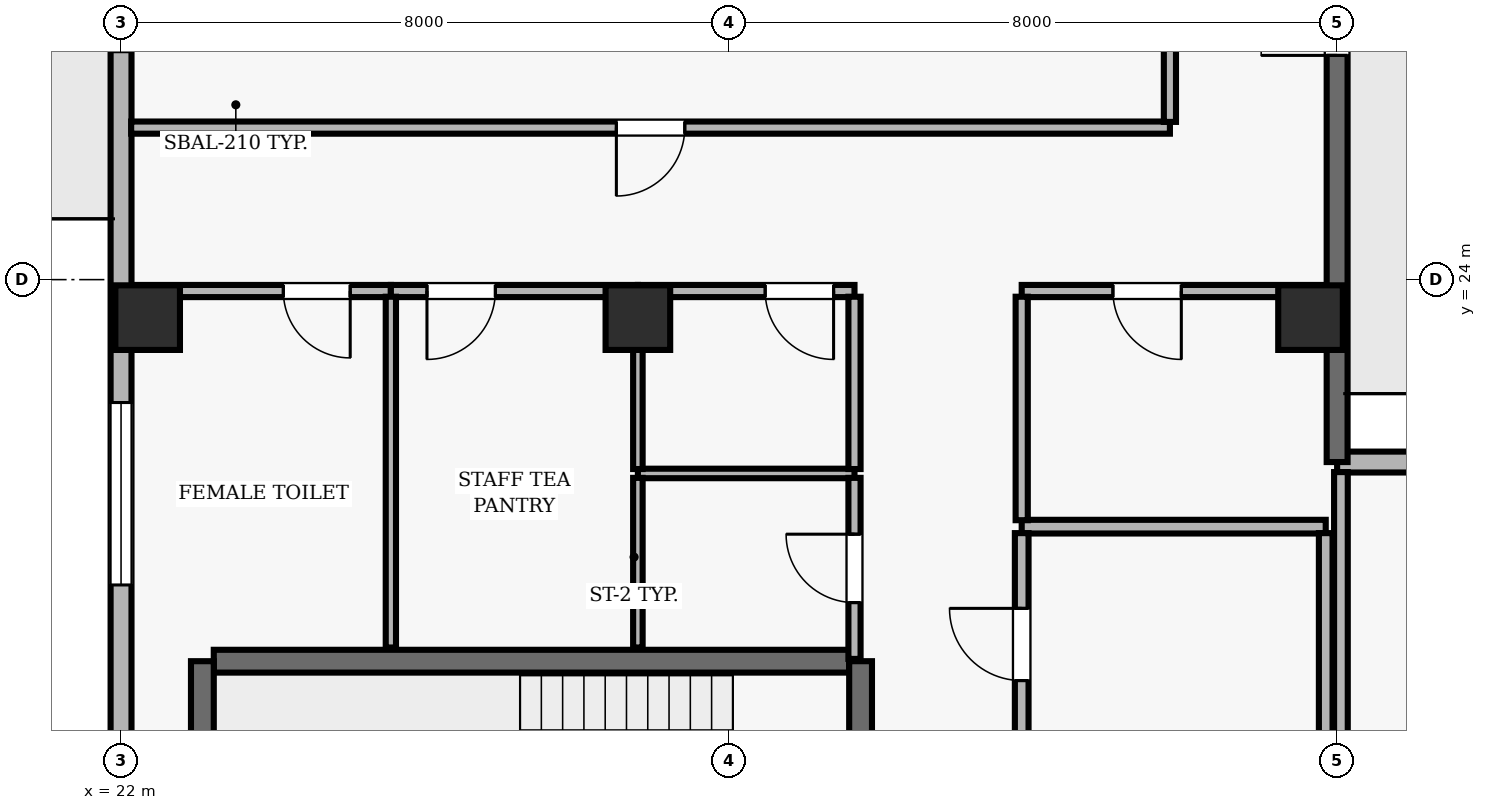
"""IFC4 building model, lengths in metres.
Left out: names, types, materials, properties, quantities, classifications, styles, units other than length and angle.
Written with IfcOpenShell. Run it as: python <this file> out.ifc"""

import sys

from ifc_helpers import new_model, si_unit, direction, frame, frame_2d, origin, origin_2d, place, context, subcontext, project, spatial, rectangle, extrude, element, fill, save


model = new_model("IFC4")
c1 = context("Model", 3, precision=1e-05, world=origin(), true_north=direction((0.0, 1.0)))
c2 = subcontext(c1, "Body", "Model", "MODEL_VIEW")
j1 = project(units=[si_unit("LENGTHUNIT", "METRE"), si_unit("PLANEANGLEUNIT", "RADIAN")], contexts=[c1])
p1 = place(None, origin())
s1 = spatial("IfcSite", under=j1, at=p1, CompositionType="ELEMENT")
p2 = place(p1, origin())
s2 = spatial("IfcBuilding", under=s1, at=p2, CompositionType="ELEMENT")
p3 = place(p2, frame((0.0, 0.0, 287.2)))
s3 = spatial("IfcBuildingStorey", under=s2, at=p3, CompositionType="ELEMENT", Elevation=287.2)
for number, where, z_axis, x_axis in (
    (1, (22.35, 23.5, 0.0), (0.0, 0.0, 1.0), (1.0, 0.0, 0.0)),
    (2, (28.8, 23.5, 0.0), (0.0, 0.0, 1.0), (1.0, 0.0, 0.0)),
    (3, (37.65, 23.5, 0.0), (0.0, 0.0, 1.0), (1.0, 0.0, 0.0)),
):
    element("IfcColumn", number, at=place(p3, frame(where, z_axis=z_axis, x_axis=x_axis)), inside=s3, PredefinedType="COLUMN", context=c2, shape_type="SweptSolid", body=[
        extrude(rectangle(XDim=0.85, YDim=0.85, at=origin_2d()), origin(), (0.0, 0.0, 1.0), 3.9),
    ])
p4 = place(p3, frame((43.0, 21.6, 0.0), z_axis=(0.0, 0.0, 1.0), x_axis=(-1.0, 0.0, 0.0)))
e4 = element("IfcWall", 4, at=p4, inside=s3, PredefinedType="SOLIDWALL", context=c2, shape_type="SweptSolid", body=[
    extrude(rectangle(XDim=5.0, YDim=0.275, at=frame_2d((2.5, 0.0))), origin(), (0.0, 0.0, 1.0), 3.69),
])
p5 = place(p3, frame((38.0, 21.6, 0.0), z_axis=(0.0, 0.0, 1.0), x_axis=(0.0, 1.0, 0.0)))
e5 = element("IfcWall", 5, at=p5, inside=s3, PredefinedType="SOLIDWALL", context=c2, shape_type="SweptSolid", body=[
    extrude(rectangle(XDim=13.7, YDim=0.275, at=frame_2d((6.85, 0.0))), origin(), (0.0, 0.0, 1.0), 3.69),
])
p6 = place(p5, frame((5.35, 0.0, 0.0)))
e6 = element("IfcOpeningElement", 6, at=p6, cuts=e5, PredefinedType="OPENING", context=c2, shape_type="SweptSolid", body=[
    extrude(rectangle(XDim=1.0, YDim=2.2, at=frame_2d((0.5, 1.1))), frame((0.0, 0.147, 0.0), z_axis=(0.0, -1.0, 0.0), x_axis=(1.0, 0.0, 0.0)), (0.0, 0.0, 1.0), 0.295),
])
p7 = place(p5, frame((9.375, 0.0, 0.9)))
e7 = element("IfcOpeningElement", 7, at=p7, cuts=e5, PredefinedType="OPENING", context=c2, shape_type="SweptSolid", body=[
    extrude(rectangle(XDim=1.8, YDim=1.8, at=frame_2d((0.9, 0.9))), frame((0.0, 0.147, 0.0), z_axis=(0.0, -1.0, 0.0), x_axis=(1.0, 0.0, 0.0)), (0.0, 0.0, 1.0), 0.295),
])
p8 = place(p3, frame((22.0, 35.3, 0.0), z_axis=(0.0, 0.0, 1.0), x_axis=(0.0, -1.0, 0.0)))
e8 = element("IfcWall", 8, at=p8, inside=s3, PredefinedType="SOLIDWALL", context=c2, shape_type="SweptSolid", body=[
    extrude(rectangle(XDim=32.8, YDim=0.275, at=frame_2d((16.4, 0.0))), origin(), (0.0, 0.0, 1.0), 3.69),
])
p9 = place(p8, frame((7.3, 0.0, 0.0)))
e9 = element("IfcOpeningElement", 9, at=p9, cuts=e8, PredefinedType="OPENING", context=c2, shape_type="SweptSolid", body=[
    extrude(rectangle(XDim=1.0, YDim=2.2, at=frame_2d((0.5, 1.1))), frame((0.0, 0.147, 0.0), z_axis=(0.0, -1.0, 0.0), x_axis=(1.0, 0.0, 0.0)), (0.0, 0.0, 1.0), 0.295),
])
p10 = place(p8, frame((1.533, 0.0, 0.9)))
e10 = element("IfcOpeningElement", 10, at=p10, cuts=e8, PredefinedType="OPENING", context=c2, shape_type="SweptSolid", body=[
    extrude(rectangle(XDim=2.4, YDim=2.2, at=frame_2d((1.2, 1.1))), frame((0.0, 0.147, 0.0), z_axis=(0.0, -1.0, 0.0), x_axis=(1.0, 0.0, 0.0)), (0.0, 0.0, 1.0), 0.295),
])
p11 = place(p8, frame((12.917, 0.0, 0.9)))
e11 = element("IfcOpeningElement", 11, at=p11, cuts=e8, PredefinedType="OPENING", context=c2, shape_type="SweptSolid", body=[
    extrude(rectangle(XDim=2.4, YDim=2.2, at=frame_2d((1.2, 1.1))), frame((0.0, 0.147, 0.0), z_axis=(0.0, -1.0, 0.0), x_axis=(1.0, 0.0, 0.0)), (0.0, 0.0, 1.0), 0.295),
])
p12 = place(p8, frame((17.483, 0.0, 0.9)))
e12 = element("IfcOpeningElement", 12, at=p12, cuts=e8, PredefinedType="OPENING", context=c2, shape_type="SweptSolid", body=[
    extrude(rectangle(XDim=2.4, YDim=2.2, at=frame_2d((1.2, 1.1))), frame((0.0, 0.147, 0.0), z_axis=(0.0, -1.0, 0.0), x_axis=(1.0, 0.0, 0.0)), (0.0, 0.0, 1.0), 0.295),
])
p13 = place(p8, frame((23.4, 0.0, 0.9)))
e13 = element("IfcOpeningElement", 13, at=p13, cuts=e8, PredefinedType="OPENING", context=c2, shape_type="SweptSolid", body=[
    extrude(rectangle(XDim=2.4, YDim=2.2, at=frame_2d((1.2, 1.1))), frame((0.0, 0.147, 0.0), z_axis=(0.0, -1.0, 0.0), x_axis=(1.0, 0.0, 0.0)), (0.0, 0.0, 1.0), 0.295),
])
p14 = place(p3, frame((31.58, 18.98, 0.0), z_axis=(0.0, 0.0, 1.0), x_axis=(-1.0, 0.0, 0.0)))
e14 = element("IfcWall", 14, at=p14, inside=s3, PredefinedType="SHEAR", context=c2, shape_type="SweptSolid", body=[
    extrude(rectangle(XDim=8.36, YDim=0.3, at=frame_2d((4.18, 0.0))), origin(), (0.0, 0.0, 1.0), 3.69),
])
p15 = place(p3, frame((23.07, 18.98, 0.0), z_axis=(0.0, 0.0, 1.0), x_axis=(0.0, -1.0, 0.0)))
e15 = element("IfcWall", 15, at=p15, inside=s3, PredefinedType="SHEAR", context=c2, shape_type="SweptSolid", body=[
    extrude(rectangle(XDim=3.51, YDim=0.3, at=frame_2d((1.755, 0.0))), origin(), (0.0, 0.0, 1.0), 3.69),
])
p16 = place(p3, frame((31.73, 15.47, 0.0), z_axis=(0.0, 0.0, 1.0), x_axis=(0.0, 1.0, 0.0)))
e16 = element("IfcWall", 16, at=p16, inside=s3, PredefinedType="SHEAR", context=c2, shape_type="SweptSolid", body=[
    extrude(rectangle(XDim=3.51, YDim=0.3, at=frame_2d((1.755, 0.0))), origin(), (0.0, 0.0, 1.0), 3.69),
])
p17 = place(p16, frame((1.18, 0.0, 0.0)))
e17 = element("IfcOpeningElement", 17, at=p17, cuts=e16, PredefinedType="OPENING", context=c2, shape_type="SweptSolid", body=[
    extrude(rectangle(XDim=1.15, YDim=2.15, at=frame_2d((0.575, 1.075))), frame((0.0, 0.16, 0.0), z_axis=(0.0, -1.0, 0.0), x_axis=(1.0, 0.0, 0.0)), (0.0, 0.0, 1.0), 0.32),
])
p18 = place(p3, frame((25.55, 23.85, 0.0), z_axis=(0.0, 0.0, 1.0), x_axis=(-1.0, 0.0, 0.0)))
e18 = element("IfcWall", 18, at=p18, inside=s3, PredefinedType="PARTITIONING", context=c2, shape_type="SweptSolid", body=[
    extrude(rectangle(XDim=3.35, YDim=0.16, at=frame_2d((1.675, 0.0))), origin(), (0.0, 0.0, 1.0), 3.221),
])
p19 = place(p18, frame((0.535, 0.0, 0.0)))
e19 = element("IfcOpeningElement", 19, at=p19, cuts=e18, PredefinedType="OPENING", context=c2, shape_type="SweptSolid", body=[
    extrude(rectangle(XDim=0.88, YDim=2.1, at=frame_2d((0.44, 1.05))), frame((0.0, 0.09, 0.0), z_axis=(0.0, -1.0, 0.0), x_axis=(1.0, 0.0, 0.0)), (0.0, 0.0, 1.0), 0.18),
])
p20 = place(p3, frame((28.8, 23.85, 0.0), z_axis=(0.0, 0.0, 1.0), x_axis=(-1.0, 0.0, 0.0)))
e20 = element("IfcWall", 20, at=p20, inside=s3, PredefinedType="PARTITIONING", context=c2, shape_type="SweptSolid", body=[
    extrude(rectangle(XDim=3.25, YDim=0.16, at=frame_2d((1.625, 0.0))), origin(), (0.0, 0.0, 1.0), 3.221),
])
p21 = place(p20, frame((1.875, 0.0, 0.0)))
e21 = element("IfcOpeningElement", 21, at=p21, cuts=e20, PredefinedType="OPENING", context=c2, shape_type="SweptSolid", body=[
    extrude(rectangle(XDim=0.9, YDim=2.1, at=frame_2d((0.45, 1.05))), frame((0.0, 0.09, 0.0), z_axis=(0.0, -1.0, 0.0), x_axis=(1.0, 0.0, 0.0)), (0.0, 0.0, 1.0), 0.18),
])
p22 = place(p3, frame((31.65, 21.45, 0.0), z_axis=(0.0, 0.0, 1.0), x_axis=(-1.0, 0.0, 0.0)))
e22 = element("IfcWall", 22, at=p22, inside=s3, PredefinedType="PARTITIONING", context=c2, shape_type="SweptSolid", body=[
    extrude(rectangle(XDim=2.85, YDim=0.125, at=frame_2d((1.425, 0.0))), origin(), (0.0, 0.0, 1.0), 3.69),
])
p23 = place(p3, frame((31.65, 23.85, 0.0), z_axis=(0.0, 0.0, 1.0), x_axis=(-1.0, 0.0, 0.0)))
e23 = element("IfcWall", 23, at=p23, inside=s3, PredefinedType="PARTITIONING", context=c2, shape_type="SweptSolid", body=[
    extrude(rectangle(XDim=2.85, YDim=0.16, at=frame_2d((1.425, 0.0))), origin(), (0.0, 0.0, 1.0), 3.221),
])
p24 = place(p23, frame((0.275, 0.0, 0.0)))
e24 = element("IfcOpeningElement", 24, at=p24, cuts=e23, PredefinedType="OPENING", context=c2, shape_type="SweptSolid", body=[
    extrude(rectangle(XDim=0.9, YDim=2.1, at=frame_2d((0.45, 1.05))), frame((0.0, 0.09, 0.0), z_axis=(0.0, -1.0, 0.0), x_axis=(1.0, 0.0, 0.0)), (0.0, 0.0, 1.0), 0.18),
])
p25 = place(p3, frame((35.8, 26.0, 0.0), z_axis=(0.0, 0.0, 1.0), x_axis=(-1.0, 0.0, 0.0)))
e25 = element("IfcWall", 25, at=p25, inside=s3, PredefinedType="PARTITIONING", context=c2, shape_type="SweptSolid", body=[
    extrude(rectangle(XDim=13.667, YDim=0.16, at=frame_2d((6.833, 0.0))), origin(), (0.0, 0.0, 1.0), 3.69),
])
p26 = place(p25, frame((6.383, 0.0, 0.0)))
e26 = element("IfcOpeningElement", 26, at=p26, cuts=e25, PredefinedType="OPENING", context=c2, shape_type="SweptSolid", body=[
    extrude(rectangle(XDim=0.9, YDim=2.1, at=frame_2d((0.45, 1.05))), frame((0.0, 0.09, 0.0), z_axis=(0.0, -1.0, 0.0), x_axis=(1.0, 0.0, 0.0)), (0.0, 0.0, 1.0), 0.18),
])
p27 = place(p3, frame((37.85, 20.75, 0.0), z_axis=(0.0, 0.0, 1.0), x_axis=(-1.0, 0.0, 0.0)))
e27 = element("IfcWall", 27, at=p27, inside=s3, PredefinedType="PARTITIONING", context=c2, shape_type="SweptSolid", body=[
    extrude(rectangle(XDim=4.0, YDim=0.18, at=frame_2d((2.0, 0.0))), origin(), (0.0, 0.0, 1.0), 3.69),
])
p28 = place(p3, frame((37.85, 23.85, 0.0), z_axis=(0.0, 0.0, 1.0), x_axis=(-1.0, 0.0, 0.0)))
e28 = element("IfcWall", 28, at=p28, inside=s3, PredefinedType="PARTITIONING", context=c2, shape_type="SweptSolid", body=[
    extrude(rectangle(XDim=4.0, YDim=0.16, at=frame_2d((2.0, 0.0))), origin(), (0.0, 0.0, 1.0), 3.221),
])
p29 = place(p28, frame((1.9, 0.0, 0.0)))
e29 = element("IfcOpeningElement", 29, at=p29, cuts=e28, PredefinedType="OPENING", context=c2, shape_type="SweptSolid", body=[
    extrude(rectangle(XDim=0.9, YDim=2.1, at=frame_2d((0.45, 1.05))), frame((0.0, 0.09, 0.0), z_axis=(0.0, -1.0, 0.0), x_axis=(1.0, 0.0, 0.0)), (0.0, 0.0, 1.0), 0.18),
])
p30 = place(p3, frame((25.55, 19.16, 0.0), z_axis=(0.0, 0.0, 1.0), x_axis=(0.0, 1.0, 0.0)))
e30 = element("IfcWall", 30, at=p30, inside=s3, PredefinedType="PARTITIONING", context=c2, shape_type="SweptSolid", body=[
    extrude(rectangle(XDim=4.615, YDim=0.135, at=frame_2d((2.308, 0.0))), origin(), (0.0, 0.0, 1.0), 3.69),
])
p31 = place(p3, frame((28.8, 21.392, 0.0), z_axis=(0.0, 0.0, 1.0), x_axis=(0.0, -1.0, 0.0)))
e31 = element("IfcWall", 31, at=p31, inside=s3, PredefinedType="PARTITIONING", context=c2, shape_type="SweptSolid", body=[
    extrude(rectangle(XDim=2.232, YDim=0.125, at=frame_2d((1.116, 0.0))), origin(), (0.0, 0.0, 1.0), 3.69),
])
p32 = place(p3, frame((28.8, 23.775, 0.0), z_axis=(0.0, 0.0, 1.0), x_axis=(0.0, -1.0, 0.0)))
e32 = element("IfcWall", 32, at=p32, inside=s3, PredefinedType="PARTITIONING", context=c2, shape_type="SweptSolid", body=[
    extrude(rectangle(XDim=2.267, YDim=0.125, at=frame_2d((1.133, 0.0))), origin(), (0.0, 0.0, 1.0), 3.69),
])
p33 = place(p3, frame((31.65, 19.01, 0.0), z_axis=(0.0, 0.0, 1.0), x_axis=(0.0, 1.0, 0.0)))
e33 = element("IfcWall", 33, at=p33, inside=s3, PredefinedType="PARTITIONING", context=c2, shape_type="SweptSolid", body=[
    extrude(rectangle(XDim=2.382, YDim=0.16, at=frame_2d((1.191, 0.0))), origin(), (0.0, 0.0, 1.0), 3.69),
])
p34 = place(p33, frame((0.741, 0.0, 0.0)))
e34 = element("IfcOpeningElement", 34, at=p34, cuts=e33, PredefinedType="OPENING", context=c2, shape_type="SweptSolid", body=[
    extrude(rectangle(XDim=0.9, YDim=2.1, at=frame_2d((0.45, 1.05))), frame((0.0, 0.09, 0.0), z_axis=(0.0, -1.0, 0.0), x_axis=(1.0, 0.0, 0.0)), (0.0, 0.0, 1.0), 0.18),
])
p35 = place(p3, frame((31.65, 23.775, 0.0), z_axis=(0.0, 0.0, 1.0), x_axis=(0.0, -1.0, 0.0)))
e35 = element("IfcWall", 35, at=p35, inside=s3, PredefinedType="PARTITIONING", context=c2, shape_type="SweptSolid", body=[
    extrude(rectangle(XDim=2.267, YDim=0.16, at=frame_2d((1.133, 0.0))), origin(), (0.0, 0.0, 1.0), 3.69),
])
p36 = place(p3, frame((33.85, 17.735, 0.0), z_axis=(0.0, 0.0, 1.0), x_axis=(0.0, 1.0, 0.0)))
e36 = element("IfcWall", 36, at=p36, inside=s3, PredefinedType="PARTITIONING", context=c2, shape_type="SweptSolid", body=[
    extrude(rectangle(XDim=2.93, YDim=0.18, at=frame_2d((1.465, 0.0))), origin(), (0.0, 0.0, 1.0), 3.69),
])
p37 = place(p36, frame((0.99, 0.0, 0.0)))
e37 = element("IfcOpeningElement", 37, at=p37, cuts=e36, PredefinedType="OPENING", context=c2, shape_type="SweptSolid", body=[
    extrude(rectangle(XDim=0.95, YDim=2.1, at=frame_2d((0.475, 1.05))), frame((0.0, 0.1, 0.0), z_axis=(0.0, -1.0, 0.0), x_axis=(1.0, 0.0, 0.0)), (0.0, 0.0, 1.0), 0.2),
])
p38 = place(p3, frame((33.85, 20.835, 0.0), z_axis=(0.0, 0.0, 1.0), x_axis=(0.0, 1.0, 0.0)))
e38 = element("IfcWall", 38, at=p38, inside=s3, PredefinedType="PARTITIONING", context=c2, shape_type="SweptSolid", body=[
    extrude(rectangle(XDim=2.94, YDim=0.16, at=frame_2d((1.47, 0.0))), origin(), (0.0, 0.0, 1.0), 3.69),
])
p39 = place(p3, frame((35.8, 37.313, 0.0), z_axis=(0.0, 0.0, 1.0), x_axis=(0.0, -1.0, 0.0)))
e39 = element("IfcWall", 39, at=p39, inside=s3, PredefinedType="PARTITIONING", context=c2, shape_type="SweptSolid", body=[
    extrude(rectangle(XDim=11.238, YDim=0.16, at=frame_2d((5.619, 0.0))), origin(), (0.0, 0.0, 1.0), 3.69),
])
p40 = place(p3, frame((37.85, 17.65, 0.0), z_axis=(0.0, 0.0, 1.0), x_axis=(0.0, 1.0, 0.0)))
e40 = element("IfcWall", 40, at=p40, inside=s3, PredefinedType="PARTITIONING", context=c2, shape_type="SweptSolid", body=[
    extrude(rectangle(XDim=3.015, YDim=0.18, at=frame_2d((1.508, 0.0))), origin(), (0.0, 0.0, 1.0), 3.221),
])
p41 = place(p3, frame((38.05, 21.468, 0.0), z_axis=(0.0, 0.0, 1.0), x_axis=(0.0, -1.0, 0.0)))
e41 = element("IfcWall", 41, at=p41, inside=s3, PredefinedType="PARTITIONING", context=c2, shape_type="SweptSolid", body=[
    extrude(rectangle(XDim=5.393, YDim=0.18, at=frame_2d((2.697, 0.0))), origin(), (0.0, 0.0, 1.0), 3.221),
])
p42 = place(p6, origin())
e42 = element("IfcDoor", 42, at=p42, inside=s3, OperationType="SINGLE_SWING_LEFT", PredefinedType="DOOR", context=c2, shape_type="SweptSolid", body=[
    extrude(rectangle(XDim=1.0, YDim=2.2, at=frame_2d((0.5, 1.1))), frame((0.0, 0.025, 0.0), z_axis=(0.0, -1.0, 0.0), x_axis=(1.0, 0.0, 0.0)), (0.0, 0.0, 1.0), 0.05),
])
fill(e6, e42)
p43 = place(p11, origin())
e43 = element("IfcWindow", 43, at=p43, inside=s3, PartitioningType="SINGLE_PANEL", PredefinedType="WINDOW", context=c2, shape_type="SweptSolid", body=[
    extrude(rectangle(XDim=2.4, YDim=2.2, at=frame_2d((1.2, 1.1))), frame((0.0, 0.03, 0.0), z_axis=(0.0, -1.0, 0.0), x_axis=(1.0, 0.0, 0.0)), (0.0, 0.0, 1.0), 0.06),
])
fill(e11, e43)
p44 = place(p37, origin())
e44 = element("IfcDoor", 44, at=p44, inside=s3, OperationType="SINGLE_SWING_RIGHT", PredefinedType="DOOR", context=c2, shape_type="SweptSolid", body=[
    extrude(rectangle(XDim=0.95, YDim=2.1, at=frame_2d((0.475, 1.05))), frame((0.0, 0.025, 0.0), z_axis=(0.0, -1.0, 0.0), x_axis=(1.0, 0.0, 0.0)), (0.0, 0.0, 1.0), 0.05),
])
fill(e37, e44)
p45 = place(p29, origin())
e45 = element("IfcDoor", 45, at=p45, inside=s3, OperationType="SINGLE_SWING_LEFT", PredefinedType="DOOR", context=c2, shape_type="SweptSolid", body=[
    extrude(rectangle(XDim=0.9, YDim=2.1, at=frame_2d((0.45, 1.05))), frame((0.0, 0.025, 0.0), z_axis=(0.0, -1.0, 0.0), x_axis=(1.0, 0.0, 0.0)), (0.0, 0.0, 1.0), 0.05),
])
fill(e29, e45)
p46 = place(p34, origin())
e46 = element("IfcDoor", 46, at=p46, inside=s3, OperationType="SINGLE_SWING_RIGHT", PredefinedType="DOOR", context=c2, shape_type="SweptSolid", body=[
    extrude(rectangle(XDim=0.9, YDim=2.1, at=frame_2d((0.45, 1.05))), frame((0.0, 0.025, 0.0), z_axis=(0.0, -1.0, 0.0), x_axis=(1.0, 0.0, 0.0)), (0.0, 0.0, 1.0), 0.05),
])
fill(e34, e46)
p47 = place(p24, origin())
e47 = element("IfcDoor", 47, at=p47, inside=s3, OperationType="SINGLE_SWING_LEFT", PredefinedType="DOOR", context=c2, shape_type="SweptSolid", body=[
    extrude(rectangle(XDim=0.9, YDim=2.1, at=frame_2d((0.45, 1.05))), frame((0.0, 0.025, 0.0), z_axis=(0.0, -1.0, 0.0), x_axis=(1.0, 0.0, 0.0)), (0.0, 0.0, 1.0), 0.05),
])
fill(e24, e47)
p48 = place(p19, origin())
e48 = element("IfcDoor", 48, at=p48, inside=s3, OperationType="SINGLE_SWING_LEFT", PredefinedType="DOOR", context=c2, shape_type="SweptSolid", body=[
    extrude(rectangle(XDim=0.88, YDim=2.1, at=frame_2d((0.44, 1.05))), frame((0.0, 0.025, 0.0), z_axis=(0.0, -1.0, 0.0), x_axis=(1.0, 0.0, 0.0)), (0.0, 0.0, 1.0), 0.05),
])
fill(e19, e48)
p49 = place(p21, origin())
e49 = element("IfcDoor", 49, at=p49, inside=s3, OperationType="SINGLE_SWING_RIGHT", PredefinedType="DOOR", context=c2, shape_type="SweptSolid", body=[
    extrude(rectangle(XDim=0.9, YDim=2.1, at=frame_2d((0.45, 1.05))), frame((0.0, 0.025, 0.0), z_axis=(0.0, -1.0, 0.0), x_axis=(1.0, 0.0, 0.0)), (0.0, 0.0, 1.0), 0.05),
])
fill(e21, e49)
p50 = place(p26, origin())
e50 = element("IfcDoor", 50, at=p50, inside=s3, OperationType="SINGLE_SWING_RIGHT", PredefinedType="DOOR", context=c2, shape_type="SweptSolid", body=[
    extrude(rectangle(XDim=0.9, YDim=2.1, at=frame_2d((0.45, 1.05))), frame((0.0, 0.025, 0.0), z_axis=(0.0, -1.0, 0.0), x_axis=(1.0, 0.0, 0.0)), (0.0, 0.0, 1.0), 0.05),
])
fill(e26, e50)
save(model, sys.argv[1])
